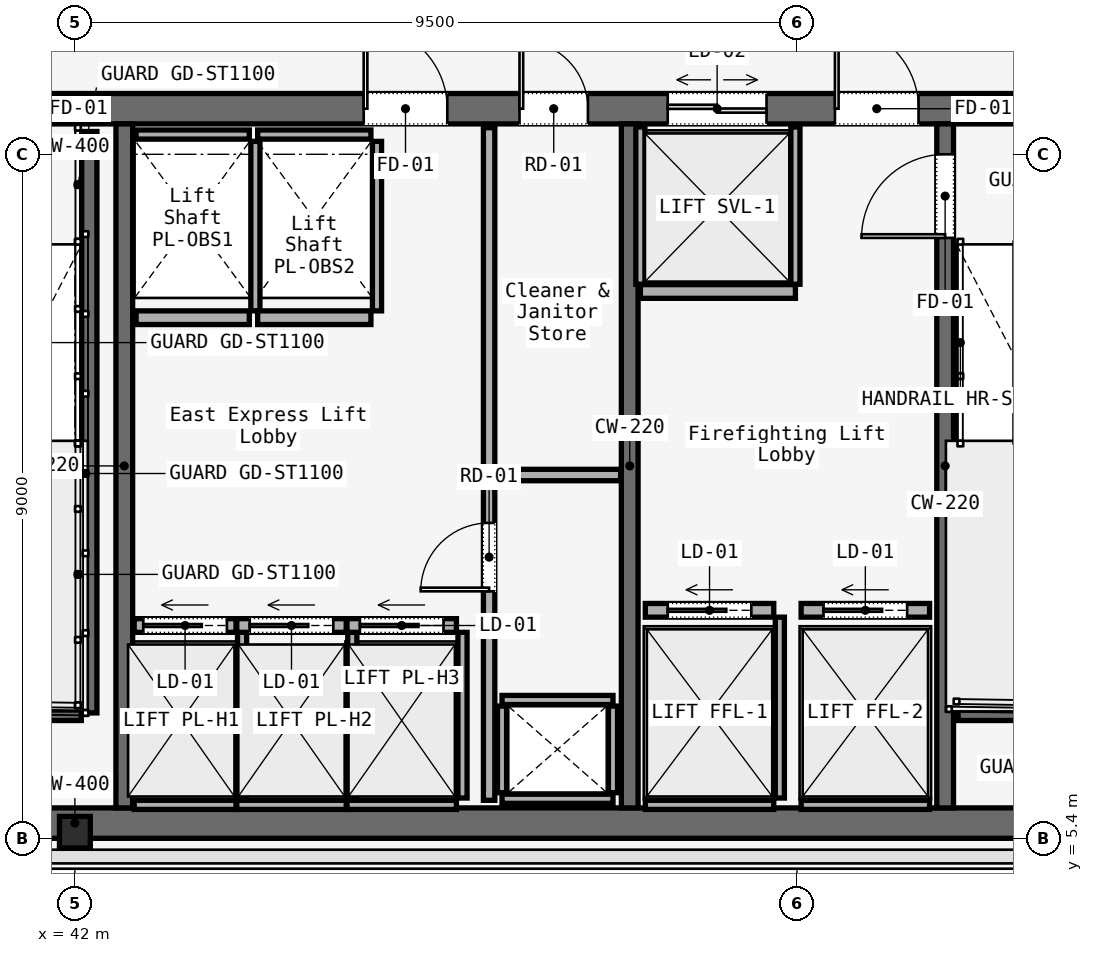
"""IFC4 building model, lengths in metres.
Left out: names, types, materials, properties, quantities, classifications, styles, units other than length and angle.
Written with IfcOpenShell. Run it as: python <this file> out.ifc"""

import sys

from ifc_helpers import new_model, si_unit, direction, frame, frame_2d, origin, origin_2d, place, context, subcontext, project, spatial, rectangle, i_section, extrude, element, fill, save


model = new_model("IFC4")
c1 = context("Model", 3, precision=1e-05, world=origin(), true_north=direction((0.0, 1.0)))
c2 = subcontext(c1, "Body", "Model", "MODEL_VIEW")
j1 = project(units=[si_unit("LENGTHUNIT", "METRE"), si_unit("PLANEANGLEUNIT", "RADIAN")], contexts=[c1])
p1 = place(None, origin())
s1 = spatial("IfcSite", under=j1, at=p1, CompositionType="ELEMENT")
p2 = place(p1, origin())
s2 = spatial("IfcBuilding", under=s1, at=p2, CompositionType="ELEMENT")
p3 = place(p2, frame((0.0, 0.0, 271.2)))
s3 = spatial("IfcBuildingStorey", under=s2, at=p3, CompositionType="ELEMENT", Elevation=271.2)
p4 = place(p3, frame((26.45, 15.0, 0.0), z_axis=(0.0, 0.0, 1.0), x_axis=(1.0, 0.0, 0.0)))
e1 = element("IfcWall", 1, at=p4, inside=s3, PredefinedType="SOLIDWALL", context=c2, shape_type="SweptSolid", body=[
    extrude(rectangle(XDim=31.1, YDim=0.4, at=frame_2d((15.55, 0.0))), origin(), (0.0, 0.0, 1.0), 3.58),
])
p5 = place(p4, frame((1.65, 0.0, 0.0)))
e2 = element("IfcOpeningElement", 2, at=p5, cuts=e1, PredefinedType="OPENING", context=c2, shape_type="SweptSolid", body=[
    extrude(rectangle(XDim=1.1, YDim=2.2, at=frame_2d((0.55, 1.1))), frame((0.0, 0.2, 0.0), z_axis=(0.0, -1.0, 0.0), x_axis=(1.0, 0.0, 0.0)), (0.0, 0.0, 1.0), 0.4),
])
p6 = place(p4, frame((13.65, 0.0, 0.0)))
e3 = element("IfcOpeningElement", 3, at=p6, cuts=e1, PredefinedType="OPENING", context=c2, shape_type="SweptSolid", body=[
    extrude(rectangle(XDim=1.1, YDim=2.2, at=frame_2d((0.55, 1.1))), frame((0.0, 0.2, 0.0), z_axis=(0.0, -1.0, 0.0), x_axis=(1.0, 0.0, 0.0)), (0.0, 0.0, 1.0), 0.4),
])
p7 = place(p4, frame((25.55, 0.0, 0.0)))
e4 = element("IfcOpeningElement", 4, at=p7, cuts=e1, PredefinedType="OPENING", context=c2, shape_type="SweptSolid", body=[
    extrude(rectangle(XDim=1.1, YDim=2.2, at=frame_2d((0.55, 1.1))), frame((0.0, 0.2, 0.0), z_axis=(0.0, -1.0, 0.0), x_axis=(1.0, 0.0, 0.0)), (0.0, 0.0, 1.0), 0.4),
])
p8 = place(p4, frame((19.35, 0.0, 0.0)))
e5 = element("IfcOpeningElement", 5, at=p8, cuts=e1, PredefinedType="OPENING", context=c2, shape_type="SweptSolid", body=[
    extrude(rectangle(XDim=1.1, YDim=2.2, at=frame_2d((0.55, 1.1))), frame((0.0, 0.2, 0.0), z_axis=(0.0, -1.0, 0.0), x_axis=(1.0, 0.0, 0.0)), (0.0, 0.0, 1.0), 0.4),
])
p9 = place(p4, frame((21.4, 0.0, 0.0)))
e6 = element("IfcOpeningElement", 6, at=p9, cuts=e1, PredefinedType="OPENING", context=c2, shape_type="SweptSolid", body=[
    extrude(rectangle(XDim=0.9, YDim=2.1, at=frame_2d((0.45, 1.05))), frame((0.0, 0.2, 0.0), z_axis=(0.0, -1.0, 0.0), x_axis=(1.0, 0.0, 0.0)), (0.0, 0.0, 1.0), 0.4),
])
p10 = place(p4, frame((6.04, 0.0, 0.0)))
e7 = element("IfcOpeningElement", 7, at=p10, cuts=e1, PredefinedType="OPENING", context=c2, shape_type="SweptSolid", body=[
    extrude(rectangle(XDim=0.95, YDim=2.2, at=frame_2d((0.475, 1.1))), frame((0.0, 0.2, 0.0), z_axis=(0.0, -1.0, 0.0), x_axis=(1.0, 0.0, 0.0)), (0.0, 0.0, 1.0), 0.4),
])
p11 = place(p4, frame((9.99, 0.0, 0.0)))
e8 = element("IfcOpeningElement", 8, at=p11, cuts=e1, PredefinedType="OPENING", context=c2, shape_type="SweptSolid", body=[
    extrude(rectangle(XDim=0.95, YDim=2.2, at=frame_2d((0.475, 1.1))), frame((0.0, 0.2, 0.0), z_axis=(0.0, -1.0, 0.0), x_axis=(1.0, 0.0, 0.0)), (0.0, 0.0, 1.0), 0.4),
])
p12 = place(p4, frame((23.35, 0.0, 0.0)))
e9 = element("IfcOpeningElement", 9, at=p12, cuts=e1, PredefinedType="OPENING", context=c2, shape_type="SweptSolid", body=[
    extrude(rectangle(XDim=1.3, YDim=2.3, at=frame_2d((0.65, 1.15))), frame((0.0, 0.2, 0.0), z_axis=(0.0, -1.0, 0.0), x_axis=(1.0, 0.0, 0.0)), (0.0, 0.0, 1.0), 0.4),
])
p13 = place(p3, frame((26.45, 5.6, 0.0), z_axis=(0.0, 0.0, 1.0), x_axis=(1.0, 0.0, 0.0)))
e10 = element("IfcWall", 10, at=p13, inside=s3, PredefinedType="SOLIDWALL", context=c2, shape_type="SweptSolid", body=[
    extrude(rectangle(XDim=31.1, YDim=0.4, at=frame_2d((15.55, 0.0))), origin(), (0.0, 0.0, 1.0), 3.58),
])
for number, where, z_axis, x_axis in (
    (11, (42.65, 5.8, 0.0), (0.0, 0.0, 1.0), (0.0, 1.0, 0.0)),
    (12, (49.3, 5.8, 0.0), (0.0, 0.0, 1.0), (0.0, 1.0, 0.0)),
):
    element("IfcWall", number, at=place(p3, frame(where, z_axis=z_axis, x_axis=x_axis)), inside=s3, PredefinedType="SOLIDWALL", context=c2, shape_type="SweptSolid", body=[
        extrude(rectangle(XDim=9.0, YDim=0.22, at=frame_2d((4.5, 0.0))), origin(), (0.0, 0.0, 1.0), 3.58),
    ])
p14 = place(p3, frame((53.45, 5.8, 0.0), z_axis=(0.0, 0.0, 1.0), x_axis=(0.0, 1.0, 0.0)))
e13 = element("IfcWall", 13, at=p14, inside=s3, PredefinedType="SOLIDWALL", context=c2, shape_type="SweptSolid", body=[
    extrude(rectangle(XDim=9.0, YDim=0.22, at=frame_2d((4.5, 0.0))), origin(), (0.0, 0.0, 1.0), 3.58),
])
p15 = place(p14, frame((7.5, 0.0, 0.0)))
e14 = element("IfcOpeningElement", 14, at=p15, cuts=e13, PredefinedType="OPENING", context=c2, shape_type="SweptSolid", body=[
    extrude(rectangle(XDim=1.1, YDim=2.2, at=frame_2d((0.55, 1.1))), frame((0.0, 0.11, 0.0), z_axis=(0.0, -1.0, 0.0), x_axis=(1.0, 0.0, 0.0)), (0.0, 0.0, 1.0), 0.22),
])
p16 = place(p3, frame((42.0, 5.48, 0.0), z_axis=(0.0, 0.0, 1.0), x_axis=(1.0, 0.0, 0.0)))
e15 = element("IfcColumn", 15, at=p16, inside=s3, PredefinedType="COLUMN", context=c2, shape_type="SweptSolid", body=[
    extrude(i_section(OverallWidth=0.406, OverallDepth=0.416, WebThickness=0.03, FlangeThickness=0.037, FilletRadius=0.015, at=origin_2d()), origin(), (0.0, 0.0, 1.0), 3.58),
])
p17 = place(p3, frame((42.19, 14.7, 0.0), z_axis=(0.0, 0.0, 1.0), x_axis=(0.0, -1.0, 0.0)))
e16 = element("IfcWall", 16, at=p17, inside=s3, PredefinedType="SOLIDWALL", context=c2, shape_type="SweptSolid", body=[
    extrude(rectangle(XDim=7.65, YDim=0.2, at=frame_2d((3.825, 0.0))), origin(), (0.0, 0.0, 1.0), 3.8),
])
for number, where, z_axis, x_axis in (
    (17, (38.97, 7.05, 0.0), (0.0, 0.0, 1.0), (1.0, 0.0, 0.0)),
    (18, (53.62, 7.05, 0.0), (0.0, 0.0, 1.0), (1.0, 0.0, 0.0)),
):
    element("IfcWall", number, at=place(p3, frame(where, z_axis=z_axis, x_axis=x_axis)), inside=s3, PredefinedType="SOLIDWALL", context=c2, shape_type="SweptSolid", body=[
        extrude(rectangle(XDim=3.115, YDim=0.2, at=frame_2d((1.558, 0.0))), origin(), (0.0, 0.0, 1.0), 3.8),
    ])
for number, where, z_axis, x_axis in (
    (19, (47.62, 5.92, 0.0), (0.0, 0.0, 1.0), (1.0, 0.0, 0.0)),
    (20, (47.62, 7.22, 0.0), (0.0, 0.0, 1.0), (1.0, 0.0, 0.0)),
):
    element("IfcWall", number, at=place(p3, frame(where, z_axis=z_axis, x_axis=x_axis)), inside=s3, PredefinedType="SOLIDWALL", context=c2, shape_type="SweptSolid", body=[
        extrude(rectangle(XDim=1.46, YDim=0.12, at=frame_2d((0.73, 0.0))), origin(), (0.0, 0.0, 1.0), 3.01),
    ])
for number, where, z_axis, x_axis in (
    (21, (47.62, 6.0, 0.0), (0.0, 0.0, 1.0), (0.0, 1.0, 0.0)),
    (22, (49.08, 6.0, 0.0), (0.0, 0.0, 1.0), (0.0, 1.0, 0.0)),
):
    element("IfcWall", number, at=place(p3, frame(where, z_axis=z_axis, x_axis=x_axis)), inside=s3, PredefinedType="SOLIDWALL", context=c2, shape_type="SweptSolid", body=[
        extrude(rectangle(XDim=1.14, YDim=0.12, at=frame_2d((0.57, 0.0))), origin(), (0.0, 0.0, 1.0), 3.01),
    ])
p18 = place(p3, frame((47.45, 5.9, 0.0), z_axis=(0.0, 0.0, 1.0), x_axis=(0.0, 1.0, 0.0)))
e23 = element("IfcWall", 23, at=p18, inside=s3, PredefinedType="PARTITIONING", context=c2, shape_type="SweptSolid", body=[
    extrude(rectangle(XDim=8.85, YDim=0.15, at=frame_2d((4.425, 0.0))), origin(), (0.0, 0.0, 1.0), 3.01),
])
p19 = place(p18, frame((2.75, 0.0, 0.0)))
e24 = element("IfcOpeningElement", 24, at=p19, cuts=e23, PredefinedType="OPENING", context=c2, shape_type="SweptSolid", body=[
    extrude(rectangle(XDim=0.9, YDim=2.1, at=frame_2d((0.45, 1.05))), frame((0.0, 0.075, 0.0), z_axis=(0.0, -1.0, 0.0), x_axis=(1.0, 0.0, 0.0)), (0.0, 0.0, 1.0), 0.15),
])
p20 = place(p3, frame((47.45, 10.18, 0.0), z_axis=(0.0, 0.0, 1.0), x_axis=(1.0, 0.0, 0.0)))
e25 = element("IfcWall", 25, at=p20, inside=s3, PredefinedType="PARTITIONING", context=c2, shape_type="SweptSolid", body=[
    extrude(rectangle(XDim=1.73, YDim=0.15, at=frame_2d((0.865, 0.0))), origin(), (0.0, 0.0, 1.0), 3.01),
])
p21 = place(p3, frame((42.78, 8.2, 0.0), z_axis=(0.0, 0.0, 1.0), x_axis=(1.0, 0.0, 0.0)))
e26 = element("IfcWall", 26, at=p21, inside=s3, PredefinedType="SOLIDWALL", context=c2, shape_type="SweptSolid", body=[
    extrude(rectangle(XDim=1.34, YDim=0.18, at=frame_2d((0.67, 0.0))), origin(), (0.0, 0.0, 1.0), 3.01),
])
p22 = place(p21, frame((0.12, 0.0, 0.0)))
e27 = element("IfcOpeningElement", 27, at=p22, cuts=e26, PredefinedType="OPENING", context=c2, shape_type="SweptSolid", body=[
    extrude(rectangle(XDim=1.1, YDim=2.2, at=frame_2d((0.55, 1.1))), frame((0.0, 0.09, 0.0), z_axis=(0.0, -1.0, 0.0), x_axis=(1.0, 0.0, 0.0)), (0.0, 0.0, 1.0), 0.18),
])
p23 = place(p3, frame((42.78, 5.84, 0.0), z_axis=(0.0, 0.0, 1.0), x_axis=(1.0, 0.0, 0.0)))
e28 = element("IfcWall", 28, at=p23, inside=s3, PredefinedType="SOLIDWALL", context=c2, shape_type="SweptSolid", body=[
    extrude(rectangle(XDim=1.34, YDim=0.12, at=frame_2d((0.67, 0.0))), origin(), (0.0, 0.0, 1.0), 3.01),
])
p24 = place(p3, frame((44.2, 5.93, 0.0), z_axis=(0.0, 0.0, 1.0), x_axis=(0.0, 1.0, 0.0)))
e29 = element("IfcWall", 29, at=p24, inside=s3, PredefinedType="SOLIDWALL", context=c2, shape_type="SweptSolid", body=[
    extrude(rectangle(XDim=2.18, YDim=0.12, at=frame_2d((1.09, 0.0))), origin(), (0.0, 0.0, 1.0), 3.01),
])
p25 = place(p3, frame((44.13, 8.2, 0.0), z_axis=(0.0, 0.0, 1.0), x_axis=(1.0, 0.0, 0.0)))
e30 = element("IfcWall", 30, at=p25, inside=s3, PredefinedType="SOLIDWALL", context=c2, shape_type="SweptSolid", body=[
    extrude(rectangle(XDim=1.44, YDim=0.18, at=frame_2d((0.72, 0.0))), origin(), (0.0, 0.0, 1.0), 3.01),
])
p26 = place(p25, frame((0.17, 0.0, 0.0)))
e31 = element("IfcOpeningElement", 31, at=p26, cuts=e30, PredefinedType="OPENING", context=c2, shape_type="SweptSolid", body=[
    extrude(rectangle(XDim=1.1, YDim=2.2, at=frame_2d((0.55, 1.1))), frame((0.0, 0.09, 0.0), z_axis=(0.0, -1.0, 0.0), x_axis=(1.0, 0.0, 0.0)), (0.0, 0.0, 1.0), 0.18),
])
p27 = place(p3, frame((44.13, 5.84, 0.0), z_axis=(0.0, 0.0, 1.0), x_axis=(1.0, 0.0, 0.0)))
e32 = element("IfcWall", 32, at=p27, inside=s3, PredefinedType="SOLIDWALL", context=c2, shape_type="SweptSolid", body=[
    extrude(rectangle(XDim=1.44, YDim=0.12, at=frame_2d((0.72, 0.0))), origin(), (0.0, 0.0, 1.0), 3.01),
])
p28 = place(p3, frame((45.65, 5.93, 0.0), z_axis=(0.0, 0.0, 1.0), x_axis=(0.0, 1.0, 0.0)))
e33 = element("IfcWall", 33, at=p28, inside=s3, PredefinedType="SOLIDWALL", context=c2, shape_type="SweptSolid", body=[
    extrude(rectangle(XDim=2.18, YDim=0.12, at=frame_2d((1.09, 0.0))), origin(), (0.0, 0.0, 1.0), 3.01),
])
p29 = place(p3, frame((45.58, 8.2, 0.0), z_axis=(0.0, 0.0, 1.0), x_axis=(1.0, 0.0, 0.0)))
e34 = element("IfcWall", 34, at=p29, inside=s3, PredefinedType="SOLIDWALL", context=c2, shape_type="SweptSolid", body=[
    extrude(rectangle(XDim=1.44, YDim=0.18, at=frame_2d((0.72, 0.0))), origin(), (0.0, 0.0, 1.0), 3.01),
])
p30 = place(p29, frame((0.17, 0.0, 0.0)))
e35 = element("IfcOpeningElement", 35, at=p30, cuts=e34, PredefinedType="OPENING", context=c2, shape_type="SweptSolid", body=[
    extrude(rectangle(XDim=1.1, YDim=2.2, at=frame_2d((0.55, 1.1))), frame((0.0, 0.09, 0.0), z_axis=(0.0, -1.0, 0.0), x_axis=(1.0, 0.0, 0.0)), (0.0, 0.0, 1.0), 0.18),
])
p31 = place(p3, frame((45.58, 5.84, 0.0), z_axis=(0.0, 0.0, 1.0), x_axis=(1.0, 0.0, 0.0)))
e36 = element("IfcWall", 36, at=p31, inside=s3, PredefinedType="SOLIDWALL", context=c2, shape_type="SweptSolid", body=[
    extrude(rectangle(XDim=1.44, YDim=0.12, at=frame_2d((0.72, 0.0))), origin(), (0.0, 0.0, 1.0), 3.01),
])
p32 = place(p3, frame((47.1, 5.93, 0.0), z_axis=(0.0, 0.0, 1.0), x_axis=(0.0, 1.0, 0.0)))
e37 = element("IfcWall", 37, at=p32, inside=s3, PredefinedType="SOLIDWALL", context=c2, shape_type="SweptSolid", body=[
    extrude(rectangle(XDim=2.18, YDim=0.12, at=frame_2d((1.09, 0.0))), origin(), (0.0, 0.0, 1.0), 3.01),
])
p33 = place(p3, frame((42.805, 12.25, 0.0), z_axis=(0.0, 0.0, 1.0), x_axis=(1.0, 0.0, 0.0)))
e38 = element("IfcWall", 38, at=p33, inside=s3, PredefinedType="SOLIDWALL", context=c2, shape_type="SweptSolid", body=[
    extrude(rectangle(XDim=1.49, YDim=0.18, at=frame_2d((0.745, 0.0))), origin(), (0.0, 0.0, 1.0), 3.01),
])
p34 = place(p3, frame((42.805, 14.66, 0.0), z_axis=(0.0, 0.0, 1.0), x_axis=(1.0, 0.0, 0.0)))
e39 = element("IfcWall", 39, at=p34, inside=s3, PredefinedType="SOLIDWALL", context=c2, shape_type="SweptSolid", body=[
    extrude(rectangle(XDim=1.49, YDim=0.12, at=frame_2d((0.745, 0.0))), origin(), (0.0, 0.0, 1.0), 3.01),
])
p35 = place(p3, frame((44.375, 12.34, 0.0), z_axis=(0.0, 0.0, 1.0), x_axis=(0.0, 1.0, 0.0)))
e40 = element("IfcWall", 40, at=p35, inside=s3, PredefinedType="SOLIDWALL", context=c2, shape_type="SweptSolid", body=[
    extrude(rectangle(XDim=2.23, YDim=0.12, at=frame_2d((1.115, 0.0))), origin(), (0.0, 0.0, 1.0), 3.01),
])
p36 = place(p3, frame((44.405, 12.25, 0.0), z_axis=(0.0, 0.0, 1.0), x_axis=(1.0, 0.0, 0.0)))
e41 = element("IfcWall", 41, at=p36, inside=s3, PredefinedType="SOLIDWALL", context=c2, shape_type="SweptSolid", body=[
    extrude(rectangle(XDim=1.49, YDim=0.18, at=frame_2d((0.745, 0.0))), origin(), (0.0, 0.0, 1.0), 3.01),
])
p37 = place(p3, frame((44.405, 14.66, 0.0), z_axis=(0.0, 0.0, 1.0), x_axis=(1.0, 0.0, 0.0)))
e42 = element("IfcWall", 42, at=p37, inside=s3, PredefinedType="SOLIDWALL", context=c2, shape_type="SweptSolid", body=[
    extrude(rectangle(XDim=1.49, YDim=0.12, at=frame_2d((0.745, 0.0))), origin(), (0.0, 0.0, 1.0), 3.01),
])
p38 = place(p3, frame((45.975, 12.34, 0.0), z_axis=(0.0, 0.0, 1.0), x_axis=(0.0, 1.0, 0.0)))
e43 = element("IfcWall", 43, at=p38, inside=s3, PredefinedType="SOLIDWALL", context=c2, shape_type="SweptSolid", body=[
    extrude(rectangle(XDim=2.23, YDim=0.12, at=frame_2d((1.115, 0.0))), origin(), (0.0, 0.0, 1.0), 3.01),
])
p39 = place(p3, frame((49.505, 8.4, 0.0), z_axis=(0.0, 0.0, 1.0), x_axis=(1.0, 0.0, 0.0)))
e44 = element("IfcWall", 44, at=p39, inside=s3, PredefinedType="SOLIDWALL", context=c2, shape_type="SweptSolid", body=[
    extrude(rectangle(XDim=1.69, YDim=0.18, at=frame_2d((0.845, 0.0))), origin(), (0.0, 0.0, 1.0), 3.01),
])
p40 = place(p39, frame((0.295, 0.0, 0.0)))
e45 = element("IfcOpeningElement", 45, at=p40, cuts=e44, PredefinedType="OPENING", context=c2, shape_type="SweptSolid", body=[
    extrude(rectangle(XDim=1.1, YDim=2.2, at=frame_2d((0.55, 1.1))), frame((0.0, 0.09, 0.0), z_axis=(0.0, -1.0, 0.0), x_axis=(1.0, 0.0, 0.0)), (0.0, 0.0, 1.0), 0.18),
])
p41 = place(p3, frame((49.505, 5.84, 0.0), z_axis=(0.0, 0.0, 1.0), x_axis=(1.0, 0.0, 0.0)))
e46 = element("IfcWall", 46, at=p41, inside=s3, PredefinedType="SOLIDWALL", context=c2, shape_type="SweptSolid", body=[
    extrude(rectangle(XDim=1.69, YDim=0.12, at=frame_2d((0.845, 0.0))), origin(), (0.0, 0.0, 1.0), 3.01),
])
p42 = place(p3, frame((51.275, 5.93, 0.0), z_axis=(0.0, 0.0, 1.0), x_axis=(0.0, 1.0, 0.0)))
e47 = element("IfcWall", 47, at=p42, inside=s3, PredefinedType="SOLIDWALL", context=c2, shape_type="SweptSolid", body=[
    extrude(rectangle(XDim=2.38, YDim=0.12, at=frame_2d((1.19, 0.0))), origin(), (0.0, 0.0, 1.0), 3.01),
])
p43 = place(p3, frame((51.555, 8.4, 0.0), z_axis=(0.0, 0.0, 1.0), x_axis=(1.0, 0.0, 0.0)))
e48 = element("IfcWall", 48, at=p43, inside=s3, PredefinedType="SOLIDWALL", context=c2, shape_type="SweptSolid", body=[
    extrude(rectangle(XDim=1.69, YDim=0.18, at=frame_2d((0.845, 0.0))), origin(), (0.0, 0.0, 1.0), 3.01),
])
p44 = place(p43, frame((0.295, 0.0, 0.0)))
e49 = element("IfcOpeningElement", 49, at=p44, cuts=e48, PredefinedType="OPENING", context=c2, shape_type="SweptSolid", body=[
    extrude(rectangle(XDim=1.1, YDim=2.2, at=frame_2d((0.55, 1.1))), frame((0.0, 0.09, 0.0), z_axis=(0.0, -1.0, 0.0), x_axis=(1.0, 0.0, 0.0)), (0.0, 0.0, 1.0), 0.18),
])
p45 = place(p3, frame((51.555, 5.84, 0.0), z_axis=(0.0, 0.0, 1.0), x_axis=(1.0, 0.0, 0.0)))
e50 = element("IfcWall", 50, at=p45, inside=s3, PredefinedType="SOLIDWALL", context=c2, shape_type="SweptSolid", body=[
    extrude(rectangle(XDim=1.69, YDim=0.12, at=frame_2d((0.845, 0.0))), origin(), (0.0, 0.0, 1.0), 3.01),
])
p46 = place(p3, frame((49.44, 12.595, 0.0), z_axis=(0.0, 0.0, 1.0), x_axis=(1.0, 0.0, 0.0)))
e51 = element("IfcWall", 51, at=p46, inside=s3, PredefinedType="SOLIDWALL", context=c2, shape_type="SweptSolid", body=[
    extrude(rectangle(XDim=2.04, YDim=0.18, at=frame_2d((1.02, 0.0))), origin(), (0.0, 0.0, 1.0), 3.01),
])
for number, where, z_axis, x_axis in (
    (52, (49.44, 12.69, 0.0), (0.0, 0.0, 1.0), (0.0, 1.0, 0.0)),
    (53, (51.48, 12.69, 0.0), (0.0, 0.0, 1.0), (0.0, 1.0, 0.0)),
):
    element("IfcWall", number, at=place(p3, frame(where, z_axis=z_axis, x_axis=x_axis)), inside=s3, PredefinedType="SOLIDWALL", context=c2, shape_type="SweptSolid", body=[
        extrude(rectangle(XDim=2.07, YDim=0.12, at=frame_2d((1.035, 0.0))), origin(), (0.0, 0.0, 1.0), 3.01),
    ])
p47 = place(p7, origin())
e54 = element("IfcDoor", 54, at=p47, inside=s3, OperationType="SINGLE_SWING_RIGHT", PredefinedType="DOOR", context=c2, shape_type="SweptSolid", body=[
    extrude(rectangle(XDim=1.1, YDim=2.2, at=frame_2d((0.55, 1.1))), frame((0.0, 0.025, 0.0), z_axis=(0.0, -1.0, 0.0), x_axis=(1.0, 0.0, 0.0)), (0.0, 0.0, 1.0), 0.05),
])
fill(e4, e54)
p48 = place(p8, origin())
e55 = element("IfcDoor", 55, at=p48, inside=s3, OperationType="SINGLE_SWING_LEFT", PredefinedType="DOOR", context=c2, shape_type="SweptSolid", body=[
    extrude(rectangle(XDim=1.1, YDim=2.2, at=frame_2d((0.55, 1.1))), frame((0.0, 0.025, 0.0), z_axis=(0.0, -1.0, 0.0), x_axis=(1.0, 0.0, 0.0)), (0.0, 0.0, 1.0), 0.05),
])
fill(e5, e55)
p49 = place(p9, origin())
e56 = element("IfcDoor", 56, at=p49, inside=s3, OperationType="SINGLE_SWING_LEFT", PredefinedType="DOOR", context=c2, shape_type="SweptSolid", body=[
    extrude(rectangle(XDim=0.9, YDim=2.1, at=frame_2d((0.45, 1.05))), frame((0.0, 0.025, 0.0), z_axis=(0.0, -1.0, 0.0), x_axis=(1.0, 0.0, 0.0)), (0.0, 0.0, 1.0), 0.05),
])
fill(e6, e56)
p50 = place(p15, origin())
e57 = element("IfcDoor", 57, at=p50, inside=s3, OperationType="SINGLE_SWING_LEFT", PredefinedType="DOOR", context=c2, shape_type="SweptSolid", body=[
    extrude(rectangle(XDim=1.1, YDim=2.2, at=frame_2d((0.55, 1.1))), frame((0.0, 0.025, 0.0), z_axis=(0.0, -1.0, 0.0), x_axis=(1.0, 0.0, 0.0)), (0.0, 0.0, 1.0), 0.05),
])
fill(e14, e57)
p51 = place(p19, origin())
e58 = element("IfcDoor", 58, at=p51, inside=s3, OperationType="SINGLE_SWING_RIGHT", PredefinedType="DOOR", context=c2, shape_type="SweptSolid", body=[
    extrude(rectangle(XDim=0.9, YDim=2.1, at=frame_2d((0.45, 1.05))), frame((0.0, 0.025, 0.0), z_axis=(0.0, -1.0, 0.0), x_axis=(1.0, 0.0, 0.0)), (0.0, 0.0, 1.0), 0.05),
])
fill(e24, e58)
p52 = place(p22, origin())
e59 = element("IfcDoor", 59, at=p52, inside=s3, OperationType="SLIDING_TO_LEFT", PredefinedType="DOOR", context=c2, shape_type="SweptSolid", body=[
    extrude(rectangle(XDim=1.1, YDim=2.2, at=frame_2d((0.55, 1.1))), frame((0.0, 0.025, 0.0), z_axis=(0.0, -1.0, 0.0), x_axis=(1.0, 0.0, 0.0)), (0.0, 0.0, 1.0), 0.05),
])
fill(e27, e59)
p53 = place(p26, origin())
e60 = element("IfcDoor", 60, at=p53, inside=s3, OperationType="SLIDING_TO_LEFT", PredefinedType="DOOR", context=c2, shape_type="SweptSolid", body=[
    extrude(rectangle(XDim=1.1, YDim=2.2, at=frame_2d((0.55, 1.1))), frame((0.0, 0.025, 0.0), z_axis=(0.0, -1.0, 0.0), x_axis=(1.0, 0.0, 0.0)), (0.0, 0.0, 1.0), 0.05),
])
fill(e31, e60)
p54 = place(p30, origin())
e61 = element("IfcDoor", 61, at=p54, inside=s3, OperationType="SLIDING_TO_LEFT", PredefinedType="DOOR", context=c2, shape_type="SweptSolid", body=[
    extrude(rectangle(XDim=1.1, YDim=2.2, at=frame_2d((0.55, 1.1))), frame((0.0, 0.025, 0.0), z_axis=(0.0, -1.0, 0.0), x_axis=(1.0, 0.0, 0.0)), (0.0, 0.0, 1.0), 0.05),
])
fill(e35, e61)
p55 = place(p40, origin())
e62 = element("IfcDoor", 62, at=p55, inside=s3, OperationType="SLIDING_TO_LEFT", PredefinedType="DOOR", context=c2, shape_type="SweptSolid", body=[
    extrude(rectangle(XDim=1.1, YDim=2.2, at=frame_2d((0.55, 1.1))), frame((0.0, 0.025, 0.0), z_axis=(0.0, -1.0, 0.0), x_axis=(1.0, 0.0, 0.0)), (0.0, 0.0, 1.0), 0.05),
])
fill(e45, e62)
p56 = place(p44, origin())
e63 = element("IfcDoor", 63, at=p56, inside=s3, OperationType="SLIDING_TO_LEFT", PredefinedType="DOOR", context=c2, shape_type="SweptSolid", body=[
    extrude(rectangle(XDim=1.1, YDim=2.2, at=frame_2d((0.55, 1.1))), frame((0.0, 0.025, 0.0), z_axis=(0.0, -1.0, 0.0), x_axis=(1.0, 0.0, 0.0)), (0.0, 0.0, 1.0), 0.05),
])
fill(e49, e63)
p57 = place(p12, origin())
e64 = element("IfcDoor", 64, at=p57, inside=s3, OperationType="DOUBLE_DOOR_SLIDING", PredefinedType="DOOR", context=c2, shape_type="SweptSolid", body=[
    extrude(rectangle(XDim=1.3, YDim=2.3, at=frame_2d((0.65, 1.15))), frame((0.0, 0.025, 0.0), z_axis=(0.0, -1.0, 0.0), x_axis=(1.0, 0.0, 0.0)), (0.0, 0.0, 1.0), 0.05),
])
fill(e9, e64)
save(model, sys.argv[1])
